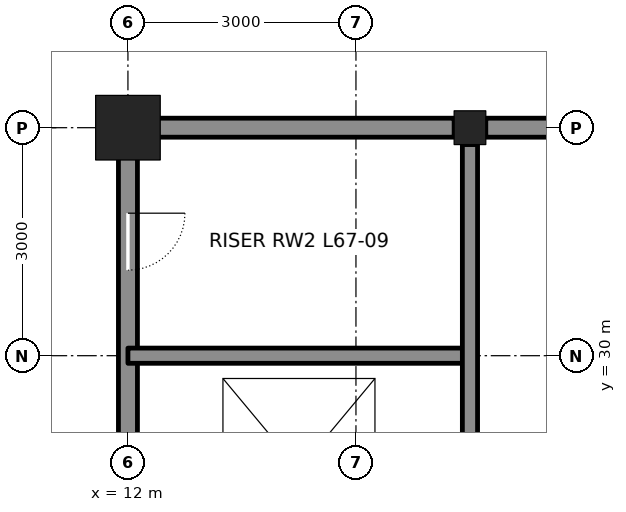
"""IFC4 building model, lengths in metres.
Left out: names, types, materials, properties, quantities, classifications, styles, units other than length and angle.
Written with IfcOpenShell. Run it as: python <this file> out.ifc"""

import sys

from ifc_helpers import new_model, si_unit, direction, frame, frame_2d, origin, origin_2d, place, context, subcontext, project, spatial, rectangle, hollow_rectangle, i_section, extrude, element, fill, save


model = new_model("IFC4")
c1 = context("Model", 3, precision=1e-05, world=origin(), true_north=direction((0.0, 1.0)))
c2 = subcontext(c1, "Body", "Model", "MODEL_VIEW")
j1 = project(units=[si_unit("LENGTHUNIT", "METRE"), si_unit("PLANEANGLEUNIT", "RADIAN")], contexts=[c1])
p1 = place(None, origin())
s1 = spatial("IfcSite", under=j1, at=p1, CompositionType="ELEMENT")
p2 = place(p1, origin())
s2 = spatial("IfcBuilding", under=s1, at=p2, CompositionType="ELEMENT")
p3 = place(p2, frame((0.0, 0.0, 300.0)))
s3 = spatial("IfcBuildingStorey", under=s2, at=p3, CompositionType="ELEMENT", Elevation=300.0)
p4 = place(p3, frame((12.0, 33.0, 0.0), z_axis=(0.0, 0.0, 1.0), x_axis=(1.0, 0.0, 0.0)))
e1 = element("IfcColumn", 1, at=p4, inside=s3, PredefinedType="COLUMN", context=c2, shape_type="SweptSolid", body=[
    extrude(hollow_rectangle(XDim=0.85, YDim=0.85, WallThickness=0.085, at=origin_2d()), origin(), (0.0, 0.0, 1.0), 6.0),
])
p5 = place(p3, frame((16.5, 33.0, 0.0), z_axis=(0.0, 0.0, 1.0), x_axis=(1.0, 0.0, 0.0)))
e2 = element("IfcColumn", 2, at=p5, inside=s3, PredefinedType="COLUMN", context=c2, shape_type="SweptSolid", body=[
    extrude(i_section(OverallWidth=0.417, OverallDepth=0.445, WebThickness=0.039, FlangeThickness=0.063, at=origin_2d()), origin(), (0.0, 0.0, 1.0), 6.0),
])
p6 = place(p3, frame((12.0, 24.222, 0.0), z_axis=(0.0, 0.0, 1.0), x_axis=(0.0, 1.0, 0.0)))
e3 = element("IfcWall", 3, at=p6, inside=s3, PredefinedType="SOLIDWALL", context=c2, shape_type="SweptSolid", body=[
    extrude(rectangle(XDim=8.528, YDim=0.25, at=frame_2d((4.264, 0.0))), origin(), (0.0, 0.0, 1.0), 4.913),
])
p7 = place(p6, frame((0.678, 0.0, 0.0)))
e4 = element("IfcOpeningElement", 4, at=p7, cuts=e3, PredefinedType="OPENING", context=c2, shape_type="SweptSolid", body=[
    extrude(rectangle(XDim=1.2, YDim=2.1, at=frame_2d((0.6, 1.05))), frame((0.0, 0.135, 0.0), z_axis=(0.0, -1.0, 0.0), x_axis=(1.0, 0.0, 0.0)), (0.0, 0.0, 1.0), 0.27),
])
p8 = place(p6, frame((6.903, 0.0, 0.0)))
e5 = element("IfcOpeningElement", 5, at=p8, cuts=e3, PredefinedType="OPENING", context=c2, shape_type="SweptSolid", body=[
    extrude(rectangle(XDim=0.75, YDim=2.1, at=frame_2d((0.375, 1.05))), frame((0.0, 0.135, 0.0), z_axis=(0.0, -1.0, 0.0), x_axis=(1.0, 0.0, 0.0)), (0.0, 0.0, 1.0), 0.27),
])
p9 = place(p3, frame((12.0, 30.0, 0.0), z_axis=(0.0, 0.0, 1.0), x_axis=(1.0, 0.0, 0.0)))
e6 = element("IfcWall", 6, at=p9, inside=s3, PredefinedType="SOLIDWALL", context=c2, shape_type="SweptSolid", body=[
    extrude(rectangle(XDim=4.5, YDim=0.2, at=frame_2d((2.25, 0.0))), origin(), (0.0, 0.0, 1.0), 5.84),
])
p10 = place(p3, frame((12.25, 33.0, 0.0), z_axis=(0.0, 0.0, 1.0), x_axis=(1.0, 0.0, 0.0)))
e7 = element("IfcWall", 7, at=p10, inside=s3, PredefinedType="SOLIDWALL", context=c2, shape_type="SweptSolid", body=[
    extrude(rectangle(XDim=4.042, YDim=0.25, at=frame_2d((2.021, 0.0))), origin(), (0.0, 0.0, 1.0), 4.981),
])
p11 = place(p3, frame((16.708, 33.0, 0.0), z_axis=(0.0, 0.0, 1.0), x_axis=(1.0, 0.0, 0.0)))
e8 = element("IfcWall", 8, at=p11, inside=s3, PredefinedType="SOLIDWALL", context=c2, shape_type="SweptSolid", body=[
    extrude(rectangle(XDim=2.583, YDim=0.25, at=frame_2d((1.292, 0.0))), origin(), (0.0, 0.0, 1.0), 4.981),
])
p12 = place(p3, frame((16.5, 24.222, 0.0), z_axis=(0.0, 0.0, 1.0), x_axis=(0.0, 1.0, 0.0)))
e9 = element("IfcWall", 9, at=p12, inside=s3, PredefinedType="SOLIDWALL", context=c2, shape_type="SweptSolid", body=[
    extrude(rectangle(XDim=8.555, YDim=0.2, at=frame_2d((4.278, 0.0))), origin(), (0.0, 0.0, 1.0), 4.913),
])
p13 = place(p8, frame((0.75, 0.0, 0.0), z_axis=(0.0, 0.0, 1.0), x_axis=(-1.0, 0.0, 0.0)))
e10 = element("IfcDoor", 10, at=p13, inside=s3, OperationType="SINGLE_SWING_LEFT", PredefinedType="DOOR", context=c2, shape_type="SweptSolid", body=[
    extrude(rectangle(XDim=0.75, YDim=2.1, at=frame_2d((0.375, 1.05))), frame((0.0, 0.025, 0.0), z_axis=(0.0, -1.0, 0.0), x_axis=(1.0, 0.0, 0.0)), (0.0, 0.0, 1.0), 0.05),
])
fill(e5, e10)
save(model, sys.argv[1])
